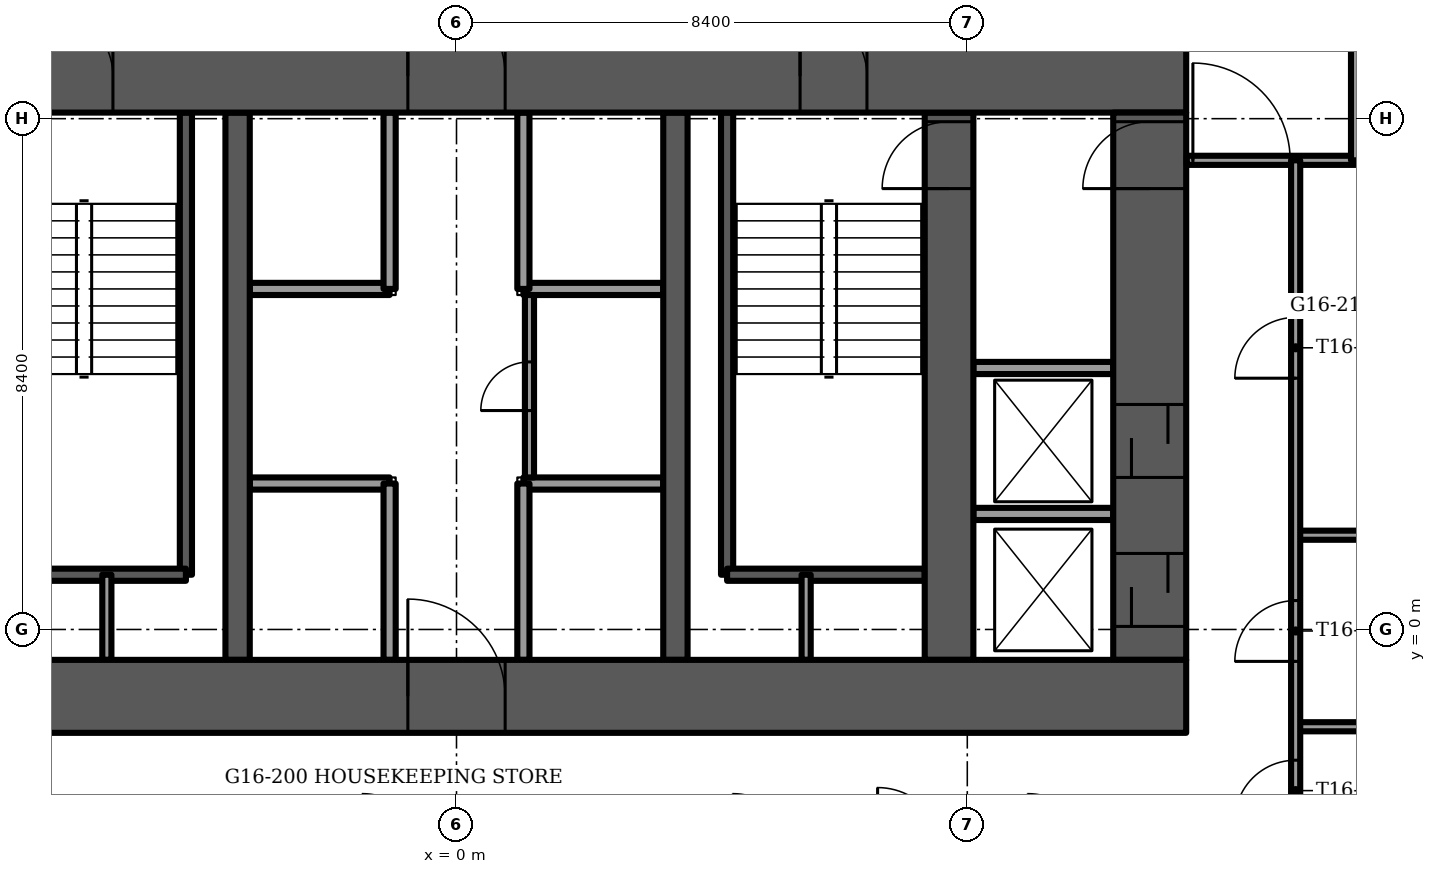
"""IFC4 building model, lengths in metres.
Left out: names, types, materials, properties, quantities, classifications, styles, units other than length and angle.
Written with IfcOpenShell. Run it as: python <this file> out.ifc"""

import sys

from ifc_helpers import new_model, si_unit, direction, frame, frame_2d, origin, place, context, subcontext, project, spatial, rectangle, extrude, element, fill, save


model = new_model("IFC4")
c1 = context("Model", 3, precision=1e-05, world=origin(), true_north=direction((0.0, 1.0)))
c2 = subcontext(c1, "Body", "Model", "MODEL_VIEW")
j1 = project(units=[si_unit("LENGTHUNIT", "METRE"), si_unit("PLANEANGLEUNIT", "RADIAN")], contexts=[c1])
p1 = place(None, origin())
s1 = spatial("IfcSite", under=j1, at=p1, CompositionType="ELEMENT")
p2 = place(p1, origin())
s2 = spatial("IfcBuilding", under=s1, at=p2, CompositionType="ELEMENT")
p3 = place(p2, frame((0.0, 0.0, 65.5)))
s3 = spatial("IfcBuildingStorey", under=s2, at=p3, CompositionType="ELEMENT", Elevation=65.5)
p4 = place(p3, frame((-12.0, -1.1, -0.3), z_axis=(0.0, 0.0, 1.0), x_axis=(1.0, 0.0, 0.0)))
e1 = element("IfcWall", 1, at=p4, inside=s3, PredefinedType="SHEAR", context=c2, shape_type="SweptSolid", body=[
    extrude(rectangle(XDim=24.0, YDim=1.2, at=frame_2d((12.0, 0.0))), origin(), (0.0, 0.0, 1.0), 3.75),
])
p5 = place(p4, frame((11.2, 0.0, 0.0)))
e2 = element("IfcOpeningElement", 2, at=p5, cuts=e1, PredefinedType="OPENING", context=c2, shape_type="SweptSolid", body=[
    extrude(rectangle(XDim=1.6, YDim=2.1, at=frame_2d((0.8, 1.05))), frame((0.0, 0.6, 0.0), z_axis=(0.0, -1.0, 0.0), x_axis=(1.0, 0.0, 0.0)), (0.0, 0.0, 1.0), 1.2),
])
p6 = place(p3, frame((-12.0, 9.1, -0.3), z_axis=(0.0, 0.0, 1.0), x_axis=(1.0, 0.0, 0.0)))
e3 = element("IfcWall", 3, at=p6, inside=s3, PredefinedType="SHEAR", context=c2, shape_type="SweptSolid", body=[
    extrude(rectangle(XDim=24.0, YDim=1.2, at=frame_2d((12.0, 0.0))), origin(), (0.0, 0.0, 1.0), 3.75),
])
p7 = place(p6, frame((11.2, 0.0, 0.0)))
e4 = element("IfcOpeningElement", 4, at=p7, cuts=e3, PredefinedType="OPENING", context=c2, shape_type="SweptSolid", body=[
    extrude(rectangle(XDim=1.6, YDim=2.1, at=frame_2d((0.8, 1.05))), frame((0.0, 0.6, 0.0), z_axis=(0.0, -1.0, 0.0), x_axis=(1.0, 0.0, 0.0)), (0.0, 0.0, 1.0), 1.2),
])
p8 = place(p6, frame((5.25, 0.0, 0.0)))
e5 = element("IfcOpeningElement", 5, at=p8, cuts=e3, PredefinedType="OPENING", context=c2, shape_type="SweptSolid", body=[
    extrude(rectangle(XDim=1.1, YDim=2.1, at=frame_2d((0.55, 1.05))), frame((0.0, 0.6, 0.0), z_axis=(0.0, -1.0, 0.0), x_axis=(1.0, 0.0, 0.0)), (0.0, 0.0, 1.0), 1.2),
])
p9 = place(p6, frame((17.65, 0.0, 0.0)))
e6 = element("IfcOpeningElement", 6, at=p9, cuts=e3, PredefinedType="OPENING", context=c2, shape_type="SweptSolid", body=[
    extrude(rectangle(XDim=1.1, YDim=2.1, at=frame_2d((0.55, 1.05))), frame((0.0, 0.6, 0.0), z_axis=(0.0, -1.0, 0.0), x_axis=(1.0, 0.0, 0.0)), (0.0, 0.0, 1.0), 1.2),
])
p10 = place(p3, frame((8.1, -0.5, -0.3), z_axis=(0.0, 0.0, 1.0), x_axis=(0.0, 1.0, 0.0)))
e7 = element("IfcWall", 7, at=p10, inside=s3, PredefinedType="SHEAR", context=c2, shape_type="SweptSolid", body=[
    extrude(rectangle(XDim=9.0, YDim=0.8, at=frame_2d((4.5, 0.0))), origin(), (0.0, 0.0, 1.0), 3.75),
])
p11 = place(p10, frame((7.75, 0.0, 0.0)))
e8 = element("IfcOpeningElement", 8, at=p11, cuts=e7, PredefinedType="OPENING", context=c2, shape_type="SweptSolid", body=[
    extrude(rectangle(XDim=1.1, YDim=2.1, at=frame_2d((0.55, 1.05))), frame((0.0, 0.4, 0.0), z_axis=(0.0, -1.0, 0.0), x_axis=(1.0, 0.0, 0.0)), (0.0, 0.0, 1.0), 0.8),
])
for number, where, z_axis, x_axis in (
    (9, (-3.6, -0.5, -0.3), (0.0, 0.0, 1.0), (0.0, 1.0, 0.0)),
    (10, (3.6, -0.5, -0.3), (0.0, 0.0, 1.0), (0.0, 1.0, 0.0)),
):
    element("IfcWall", number, at=place(p3, frame(where, z_axis=z_axis, x_axis=x_axis)), inside=s3, PredefinedType="SHEAR", context=c2, shape_type="SweptSolid", body=[
        extrude(rectangle(XDim=9.0, YDim=0.4, at=frame_2d((4.5, 0.0))), origin(), (0.0, 0.0, 1.0), 3.75),
    ])
p12 = place(p3, frame((11.4, -0.5, -0.3), z_axis=(0.0, 0.0, 1.0), x_axis=(0.0, 1.0, 0.0)))
e11 = element("IfcWall", 11, at=p12, inside=s3, PredefinedType="SHEAR", context=c2, shape_type="SweptSolid", body=[
    extrude(rectangle(XDim=9.0, YDim=1.2, at=frame_2d((4.5, 0.0))), origin(), (0.0, 0.0, 1.0), 3.75),
])
p13 = place(p12, frame((7.75, 0.0, 0.0)))
e12 = element("IfcOpeningElement", 12, at=p13, cuts=e11, PredefinedType="OPENING", context=c2, shape_type="SweptSolid", body=[
    extrude(rectangle(XDim=1.1, YDim=2.1, at=frame_2d((0.55, 1.05))), frame((0.0, 0.6, 0.0), z_axis=(0.0, -1.0, 0.0), x_axis=(1.0, 0.0, 0.0)), (0.0, 0.0, 1.0), 1.2),
])
p14 = place(p12, frame((0.55, 0.0, 0.0)))
e13 = element("IfcOpeningElement", 13, at=p14, cuts=e11, PredefinedType="OPENING", context=c2, shape_type="SweptSolid", body=[
    extrude(rectangle(XDim=1.2, YDim=2.1, at=frame_2d((0.6, 1.05))), frame((0.0, 0.6, 0.0), z_axis=(0.0, -1.0, 0.0), x_axis=(1.0, 0.0, 0.0)), (0.0, 0.0, 1.0), 1.2),
])
p15 = place(p12, frame((3.0, 0.0, 0.0)))
e14 = element("IfcOpeningElement", 14, at=p15, cuts=e11, PredefinedType="OPENING", context=c2, shape_type="SweptSolid", body=[
    extrude(rectangle(XDim=1.2, YDim=2.1, at=frame_2d((0.6, 1.05))), frame((0.0, 0.6, 0.0), z_axis=(0.0, -1.0, 0.0), x_axis=(1.0, 0.0, 0.0)), (0.0, 0.0, 1.0), 1.2),
])
p16 = place(p3, frame((14.679, -11.425, 0.0), z_axis=(0.0, 0.0, 1.0), x_axis=(0.500010091595, 0.866019577321, 0.0)))
e15 = element("IfcWall", 15, at=p16, inside=s3, PredefinedType="SOLIDWALL", context=c2, shape_type="SweptSolid", body=[
    extrude(rectangle(XDim=11.633, YDim=0.15, at=frame_2d((5.816, 0.0))), origin(), (0.0, 0.0, 1.0), 3.45),
])
p17 = place(p16, frame((3.632, 0.0, 0.15)))
e16 = element("IfcOpeningElement", 16, at=p17, cuts=e15, PredefinedType="OPENING", context=c2, shape_type="SweptSolid", body=[
    extrude(rectangle(XDim=1.5, YDim=2.2, at=frame_2d((0.75, 1.1))), frame((0.0, 0.075, 0.0), z_axis=(0.0, -1.0, 0.0), x_axis=(1.0, 0.0, 0.0)), (0.0, 0.0, 1.0), 0.15),
])
p18 = place(p16, frame((9.296, 0.0, 0.15)))
e17 = element("IfcOpeningElement", 17, at=p18, cuts=e15, PredefinedType="OPENING", context=c2, shape_type="SweptSolid", body=[
    extrude(rectangle(XDim=0.9, YDim=2.2, at=frame_2d((0.45, 1.1))), frame((0.0, 0.075, 0.0), z_axis=(0.0, -1.0, 0.0), x_axis=(1.0, 0.0, 0.0)), (0.0, 0.0, 1.0), 0.15),
])
p19 = place(p16, frame((7.096, 0.0, 0.15)))
e18 = element("IfcOpeningElement", 18, at=p19, cuts=e15, PredefinedType="OPENING", context=c2, shape_type="SweptSolid", body=[
    extrude(rectangle(XDim=1.5, YDim=2.2, at=frame_2d((0.75, 1.1))), frame((0.0, 0.075, 0.0), z_axis=(0.0, -1.0, 0.0), x_axis=(1.0, 0.0, 0.0)), (0.0, 0.0, 1.0), 0.15),
])
p20 = place(p3, frame((20.496, -0.286, 0.0), z_axis=(0.0, 0.0, 1.0), x_axis=(-0.500001004067, 0.866024824085, 0.0)))
e19 = element("IfcWall", 19, at=p20, inside=s3, PredefinedType="SOLIDWALL", context=c2, shape_type="SweptSolid", body=[
    extrude(rectangle(XDim=11.633, YDim=0.15, at=frame_2d((5.817, 0.0))), origin(), (0.0, 0.0, 1.0), 3.45),
])
p21 = place(p20, frame((0.295, 0.0, 0.15)))
e20 = element("IfcOpeningElement", 20, at=p21, cuts=e19, PredefinedType="OPENING", context=c2, shape_type="SweptSolid", body=[
    extrude(rectangle(XDim=0.9, YDim=2.2, at=frame_2d((0.45, 1.1))), frame((0.0, 0.075, 0.0), z_axis=(0.0, -1.0, 0.0), x_axis=(1.0, 0.0, 0.0)), (0.0, 0.0, 1.0), 0.15),
])
p22 = place(p20, frame((4.495, 0.0, 0.15)))
e21 = element("IfcOpeningElement", 21, at=p22, cuts=e19, PredefinedType="OPENING", context=c2, shape_type="SweptSolid", body=[
    extrude(rectangle(XDim=1.8, YDim=2.2, at=frame_2d((0.9, 1.1))), frame((0.0, 0.075, 0.0), z_axis=(0.0, -1.0, 0.0), x_axis=(1.0, 0.0, 0.0)), (0.0, 0.0, 1.0), 0.15),
])
p23 = place(p20, frame((6.595, 0.0, 0.15)))
e22 = element("IfcOpeningElement", 22, at=p23, cuts=e19, PredefinedType="OPENING", context=c2, shape_type="SweptSolid", body=[
    extrude(rectangle(XDim=1.5, YDim=2.2, at=frame_2d((0.75, 1.1))), frame((0.0, 0.075, 0.0), z_axis=(0.0, -1.0, 0.0), x_axis=(1.0, 0.0, 0.0)), (0.0, 0.0, 1.0), 0.15),
])
for number, where, z_axis, x_axis in (
    (23, (-3.4, 2.4, 0.0), (0.0, 0.0, 1.0), (1.0, 0.0, 0.0)),
    (24, (-3.4, 5.6, 0.0), (0.0, 0.0, 1.0), (1.0, 0.0, 0.0)),
    (25, (1.1, 2.4, 0.0), (0.0, 0.0, 1.0), (1.0, 0.0, 0.0)),
    (26, (1.1, 5.6, 0.0), (0.0, 0.0, 1.0), (1.0, 0.0, 0.0)),
):
    element("IfcWall", number, at=place(p3, frame(where, z_axis=z_axis, x_axis=x_axis)), inside=s3, PredefinedType="PARTITIONING", context=c2, shape_type="SweptSolid", body=[
        extrude(rectangle(XDim=2.3, YDim=0.2, at=frame_2d((1.15, 0.0))), origin(), (0.0, 0.0, 1.0), 3.45),
    ])
for number, where, z_axis, x_axis in (
    (27, (-1.1, -0.5, 0.0), (0.0, 0.0, 1.0), (0.0, 1.0, 0.0)),
    (28, (1.1, -0.5, 0.0), (0.0, 0.0, 1.0), (0.0, 1.0, 0.0)),
    (29, (-1.1, 5.6, 0.0), (0.0, 0.0, 1.0), (0.0, 1.0, 0.0)),
    (30, (1.1, 5.6, 0.0), (0.0, 0.0, 1.0), (0.0, 1.0, 0.0)),
):
    element("IfcWall", number, at=place(p3, frame(where, z_axis=z_axis, x_axis=x_axis)), inside=s3, PredefinedType="PARTITIONING", context=c2, shape_type="SweptSolid", body=[
        extrude(rectangle(XDim=2.9, YDim=0.2, at=frame_2d((1.45, 0.0))), origin(), (0.0, 0.0, 1.0), 3.45),
    ])
p24 = place(p3, frame((-4.45, 0.9, -0.3), z_axis=(0.0, 0.0, 1.0), x_axis=(0.0, 1.0, 0.0)))
e31 = element("IfcWall", 31, at=p24, inside=s3, PredefinedType="SOLIDWALL", context=c2, shape_type="SweptSolid", body=[
    extrude(rectangle(XDim=7.6, YDim=0.2, at=frame_2d((3.8, 0.0))), origin(), (0.0, 0.0, 1.0), 3.75),
])
p25 = place(p3, frame((-7.7, 0.9, -0.3), z_axis=(0.0, 0.0, 1.0), x_axis=(1.0, 0.0, 0.0)))
e32 = element("IfcWall", 32, at=p25, inside=s3, PredefinedType="SOLIDWALL", context=c2, shape_type="SweptSolid", body=[
    extrude(rectangle(XDim=3.25, YDim=0.2, at=frame_2d((1.625, 0.0))), origin(), (0.0, 0.0, 1.0), 3.75),
])
p26 = place(p3, frame((-5.75, -0.5, 0.0), z_axis=(0.0, 0.0, 1.0), x_axis=(0.0, 1.0, 0.0)))
e33 = element("IfcWall", 33, at=p26, inside=s3, PredefinedType="PARTITIONING", context=c2, shape_type="SweptSolid", body=[
    extrude(rectangle(XDim=1.4, YDim=0.15, at=frame_2d((0.7, 0.0))), origin(), (0.0, 0.0, 1.0), 3.45),
])
p27 = place(p3, frame((4.45, 0.9, -0.3), z_axis=(0.0, 0.0, 1.0), x_axis=(0.0, 1.0, 0.0)))
e34 = element("IfcWall", 34, at=p27, inside=s3, PredefinedType="SOLIDWALL", context=c2, shape_type="SweptSolid", body=[
    extrude(rectangle(XDim=7.6, YDim=0.2, at=frame_2d((3.8, 0.0))), origin(), (0.0, 0.0, 1.0), 3.75),
])
p28 = place(p3, frame((4.45, 0.9, -0.3), z_axis=(0.0, 0.0, 1.0), x_axis=(1.0, 0.0, 0.0)))
e35 = element("IfcWall", 35, at=p28, inside=s3, PredefinedType="SOLIDWALL", context=c2, shape_type="SweptSolid", body=[
    extrude(rectangle(XDim=3.25, YDim=0.2, at=frame_2d((1.625, 0.0))), origin(), (0.0, 0.0, 1.0), 3.75),
])
p29 = place(p3, frame((5.75, -0.5, 0.0), z_axis=(0.0, 0.0, 1.0), x_axis=(0.0, 1.0, 0.0)))
e36 = element("IfcWall", 36, at=p29, inside=s3, PredefinedType="PARTITIONING", context=c2, shape_type="SweptSolid", body=[
    extrude(rectangle(XDim=1.4, YDim=0.15, at=frame_2d((0.7, 0.0))), origin(), (0.0, 0.0, 1.0), 3.45),
])
p30 = place(p3, frame((1.2, 2.5, 0.0), z_axis=(0.0, 0.0, 1.0), x_axis=(0.0, 1.0, 0.0)))
e37 = element("IfcWall", 37, at=p30, inside=s3, PredefinedType="PARTITIONING", context=c2, shape_type="SweptSolid", body=[
    extrude(rectangle(XDim=3.0, YDim=0.15, at=frame_2d((1.5, 0.0))), origin(), (0.0, 0.0, 1.0), 3.45),
])
p31 = place(p30, frame((1.1, 0.0, 0.0)))
e38 = element("IfcOpeningElement", 38, at=p31, cuts=e37, PredefinedType="OPENING", context=c2, shape_type="SweptSolid", body=[
    extrude(rectangle(XDim=0.8, YDim=2.1, at=frame_2d((0.4, 1.05))), frame((0.0, 0.075, 0.0), z_axis=(0.0, -1.0, 0.0), x_axis=(1.0, 0.0, 0.0)), (0.0, 0.0, 1.0), 0.15),
])
for number, where, z_axis, x_axis in (
    (39, (8.5, 1.9, 0.0), (0.0, 0.0, 1.0), (1.0, 0.0, 0.0)),
    (40, (8.5, 4.3, 0.0), (0.0, 0.0, 1.0), (1.0, 0.0, 0.0)),
):
    element("IfcWall", number, at=place(p3, frame(where, z_axis=z_axis, x_axis=x_axis)), inside=s3, PredefinedType="PARTITIONING", context=c2, shape_type="SweptSolid", body=[
        extrude(rectangle(XDim=2.3, YDim=0.2, at=frame_2d((1.15, 0.0))), origin(), (0.0, 0.0, 1.0), 3.45),
    ])
p32 = place(p3, frame((13.8, -1.6, 0.0), z_axis=(0.0, 0.0, 1.0), x_axis=(1.0, 0.0, 0.0)))
e41 = element("IfcWall", 41, at=p32, inside=s3, PredefinedType="PARTITIONING", context=c2, shape_type="SweptSolid", body=[
    extrude(rectangle(XDim=6.604, YDim=0.15, at=frame_2d((3.302, 0.0))), origin(), (0.0, 0.0, 1.0), 3.45),
])
p33 = place(p3, frame((13.8, 1.55, 0.0), z_axis=(0.0, 0.0, 1.0), x_axis=(1.0, 0.0, 0.0)))
e42 = element("IfcWall", 42, at=p33, inside=s3, PredefinedType="PARTITIONING", context=c2, shape_type="SweptSolid", body=[
    extrude(rectangle(XDim=5.688, YDim=0.15, at=frame_2d((2.844, 0.0))), origin(), (0.0, 0.0, 1.0), 3.45),
])
p34 = place(p3, frame((12.01, 7.715, 0.0), z_axis=(0.0, 0.0, 1.0), x_axis=(1.0, 0.0, 0.0)))
e43 = element("IfcWall", 43, at=p34, inside=s3, PredefinedType="PARTITIONING", context=c2, shape_type="SweptSolid", body=[
    extrude(rectangle(XDim=2.775, YDim=0.15, at=frame_2d((1.387, 0.0))), origin(), (0.0, 0.0, 1.0), 3.45),
])
p35 = place(p34, frame((0.1, 0.0, 0.0)))
e44 = element("IfcOpeningElement", 44, at=p35, cuts=e43, PredefinedType="OPENING", context=c2, shape_type="SweptSolid", body=[
    extrude(rectangle(XDim=1.6, YDim=2.1, at=frame_2d((0.8, 1.05))), frame((0.0, 0.075, 0.0), z_axis=(0.0, -1.0, 0.0), x_axis=(1.0, 0.0, 0.0)), (0.0, 0.0, 1.0), 0.15),
])
p36 = place(p3, frame((14.785, 7.715, 0.0), z_axis=(0.0, 0.0, 1.0), x_axis=(0.0, 1.0, 0.0)))
e45 = element("IfcWall", 45, at=p36, inside=s3, PredefinedType="PARTITIONING", context=c2, shape_type="SweptSolid", body=[
    extrude(rectangle(XDim=1.98, YDim=0.15, at=frame_2d((0.99, 0.0))), origin(), (0.0, 0.0, 1.0), 3.45),
])
p37 = place(p3, frame((13.8, -3.7, 0.0), z_axis=(0.0, 0.0, 1.0), x_axis=(0.0, 1.0, 0.0)))
e46 = element("IfcWall", 46, at=p37, inside=s3, PredefinedType="PARTITIONING", context=c2, shape_type="SweptSolid", body=[
    extrude(rectangle(XDim=11.415, YDim=0.15, at=frame_2d((5.708, 0.0))), origin(), (0.0, 0.0, 1.0), 3.45),
])
p38 = place(p37, frame((0.55, 0.0, 0.0)))
e47 = element("IfcOpeningElement", 47, at=p38, cuts=e46, PredefinedType="OPENING", context=c2, shape_type="SweptSolid", body=[
    extrude(rectangle(XDim=1.0, YDim=2.1, at=frame_2d((0.5, 1.05))), frame((0.0, 0.075, 0.0), z_axis=(0.0, -1.0, 0.0), x_axis=(1.0, 0.0, 0.0)), (0.0, 0.0, 1.0), 0.15),
])
p39 = place(p37, frame((3.175, 0.0, 0.0)))
e48 = element("IfcOpeningElement", 48, at=p39, cuts=e46, PredefinedType="OPENING", context=c2, shape_type="SweptSolid", body=[
    extrude(rectangle(XDim=1.0, YDim=2.1, at=frame_2d((0.5, 1.05))), frame((0.0, 0.075, 0.0), z_axis=(0.0, -1.0, 0.0), x_axis=(1.0, 0.0, 0.0)), (0.0, 0.0, 1.0), 0.15),
])
p40 = place(p37, frame((7.832, 0.0, 0.0)))
e49 = element("IfcOpeningElement", 49, at=p40, cuts=e46, PredefinedType="OPENING", context=c2, shape_type="SweptSolid", body=[
    extrude(rectangle(XDim=1.0, YDim=2.1, at=frame_2d((0.5, 1.05))), frame((0.0, 0.075, 0.0), z_axis=(0.0, -1.0, 0.0), x_axis=(1.0, 0.0, 0.0)), (0.0, 0.0, 1.0), 0.15),
])
p41 = place(p5, origin())
e50 = element("IfcDoor", 50, at=p41, inside=s3, OperationType="DOUBLE_DOOR_SINGLE_SWING", PredefinedType="DOOR", context=c2, shape_type="SweptSolid", body=[
    extrude(rectangle(XDim=1.6, YDim=2.1, at=frame_2d((0.8, 1.05))), frame((0.0, 0.025, 0.0), z_axis=(0.0, -1.0, 0.0), x_axis=(1.0, 0.0, 0.0)), (0.0, 0.0, 1.0), 0.05),
])
fill(e2, e50)
p42 = place(p7, origin())
e51 = element("IfcDoor", 51, at=p42, inside=s3, OperationType="DOUBLE_DOOR_SINGLE_SWING", PredefinedType="DOOR", context=c2, shape_type="SweptSolid", body=[
    extrude(rectangle(XDim=1.6, YDim=2.1, at=frame_2d((0.8, 1.05))), frame((0.0, 0.025, 0.0), z_axis=(0.0, -1.0, 0.0), x_axis=(1.0, 0.0, 0.0)), (0.0, 0.0, 1.0), 0.05),
])
fill(e4, e51)
p43 = place(p8, origin())
e52 = element("IfcDoor", 52, at=p43, inside=s3, OperationType="SINGLE_SWING_LEFT", PredefinedType="DOOR", context=c2, shape_type="SweptSolid", body=[
    extrude(rectangle(XDim=1.1, YDim=2.1, at=frame_2d((0.55, 1.05))), frame((0.0, 0.025, 0.0), z_axis=(0.0, -1.0, 0.0), x_axis=(1.0, 0.0, 0.0)), (0.0, 0.0, 1.0), 0.05),
])
fill(e5, e52)
p44 = place(p9, origin())
e53 = element("IfcDoor", 53, at=p44, inside=s3, OperationType="SINGLE_SWING_RIGHT", PredefinedType="DOOR", context=c2, shape_type="SweptSolid", body=[
    extrude(rectangle(XDim=1.1, YDim=2.1, at=frame_2d((0.55, 1.05))), frame((0.0, 0.025, 0.0), z_axis=(0.0, -1.0, 0.0), x_axis=(1.0, 0.0, 0.0)), (0.0, 0.0, 1.0), 0.05),
])
fill(e6, e53)
p45 = place(p11, origin())
e54 = element("IfcDoor", 54, at=p45, inside=s3, OperationType="SINGLE_SWING_LEFT", PredefinedType="DOOR", context=c2, shape_type="SweptSolid", body=[
    extrude(rectangle(XDim=1.1, YDim=2.1, at=frame_2d((0.55, 1.05))), frame((0.0, 0.025, 0.0), z_axis=(0.0, -1.0, 0.0), x_axis=(1.0, 0.0, 0.0)), (0.0, 0.0, 1.0), 0.05),
])
fill(e8, e54)
p46 = place(p31, origin())
e55 = element("IfcDoor", 55, at=p46, inside=s3, OperationType="SINGLE_SWING_RIGHT", PredefinedType="DOOR", context=c2, shape_type="SweptSolid", body=[
    extrude(rectangle(XDim=0.8, YDim=2.1, at=frame_2d((0.4, 1.05))), frame((0.0, 0.025, 0.0), z_axis=(0.0, -1.0, 0.0), x_axis=(1.0, 0.0, 0.0)), (0.0, 0.0, 1.0), 0.05),
])
fill(e38, e55)
p47 = place(p13, origin())
e56 = element("IfcDoor", 56, at=p47, inside=s3, OperationType="SINGLE_SWING_RIGHT", PredefinedType="DOOR", context=c2, shape_type="SweptSolid", body=[
    extrude(rectangle(XDim=1.1, YDim=2.1, at=frame_2d((0.55, 1.05))), frame((0.0, 0.025, 0.0), z_axis=(0.0, -1.0, 0.0), x_axis=(1.0, 0.0, 0.0)), (0.0, 0.0, 1.0), 0.05),
])
fill(e12, e56)
p48 = place(p14, origin())
e57 = element("IfcDoor", 57, at=p48, inside=s3, OperationType="SLIDING_TO_LEFT", PredefinedType="DOOR", context=c2, shape_type="SweptSolid", body=[
    extrude(rectangle(XDim=1.2, YDim=2.1, at=frame_2d((0.6, 1.05))), frame((0.0, 0.025, 0.0), z_axis=(0.0, -1.0, 0.0), x_axis=(1.0, 0.0, 0.0)), (0.0, 0.0, 1.0), 0.05),
])
fill(e13, e57)
p49 = place(p15, origin())
e58 = element("IfcDoor", 58, at=p49, inside=s3, OperationType="SLIDING_TO_LEFT", PredefinedType="DOOR", context=c2, shape_type="SweptSolid", body=[
    extrude(rectangle(XDim=1.2, YDim=2.1, at=frame_2d((0.6, 1.05))), frame((0.0, 0.025, 0.0), z_axis=(0.0, -1.0, 0.0), x_axis=(1.0, 0.0, 0.0)), (0.0, 0.0, 1.0), 0.05),
])
fill(e14, e58)
p50 = place(p38, origin())
e59 = element("IfcDoor", 59, at=p50, inside=s3, OperationType="SINGLE_SWING_LEFT", PredefinedType="DOOR", context=c2, shape_type="SweptSolid", body=[
    extrude(rectangle(XDim=1.0, YDim=2.1, at=frame_2d((0.5, 1.05))), frame((0.0, 0.025, 0.0), z_axis=(0.0, -1.0, 0.0), x_axis=(1.0, 0.0, 0.0)), (0.0, 0.0, 1.0), 0.05),
])
fill(e47, e59)
p51 = place(p39, origin())
e60 = element("IfcDoor", 60, at=p51, inside=s3, OperationType="SINGLE_SWING_LEFT", PredefinedType="DOOR", context=c2, shape_type="SweptSolid", body=[
    extrude(rectangle(XDim=1.0, YDim=2.1, at=frame_2d((0.5, 1.05))), frame((0.0, 0.025, 0.0), z_axis=(0.0, -1.0, 0.0), x_axis=(1.0, 0.0, 0.0)), (0.0, 0.0, 1.0), 0.05),
])
fill(e48, e60)
p52 = place(p40, origin())
e61 = element("IfcDoor", 61, at=p52, inside=s3, OperationType="SINGLE_SWING_LEFT", PredefinedType="DOOR", context=c2, shape_type="SweptSolid", body=[
    extrude(rectangle(XDim=1.0, YDim=2.1, at=frame_2d((0.5, 1.05))), frame((0.0, 0.025, 0.0), z_axis=(0.0, -1.0, 0.0), x_axis=(1.0, 0.0, 0.0)), (0.0, 0.0, 1.0), 0.05),
])
fill(e49, e61)
p53 = place(p35, origin())
e62 = element("IfcDoor", 62, at=p53, inside=s3, OperationType="DOUBLE_DOOR_SINGLE_SWING", PredefinedType="DOOR", context=c2, shape_type="SweptSolid", body=[
    extrude(rectangle(XDim=1.6, YDim=2.1, at=frame_2d((0.8, 1.05))), frame((0.0, 0.025, 0.0), z_axis=(0.0, -1.0, 0.0), x_axis=(1.0, 0.0, 0.0)), (0.0, 0.0, 1.0), 0.05),
])
fill(e44, e62)
save(model, sys.argv[1])
